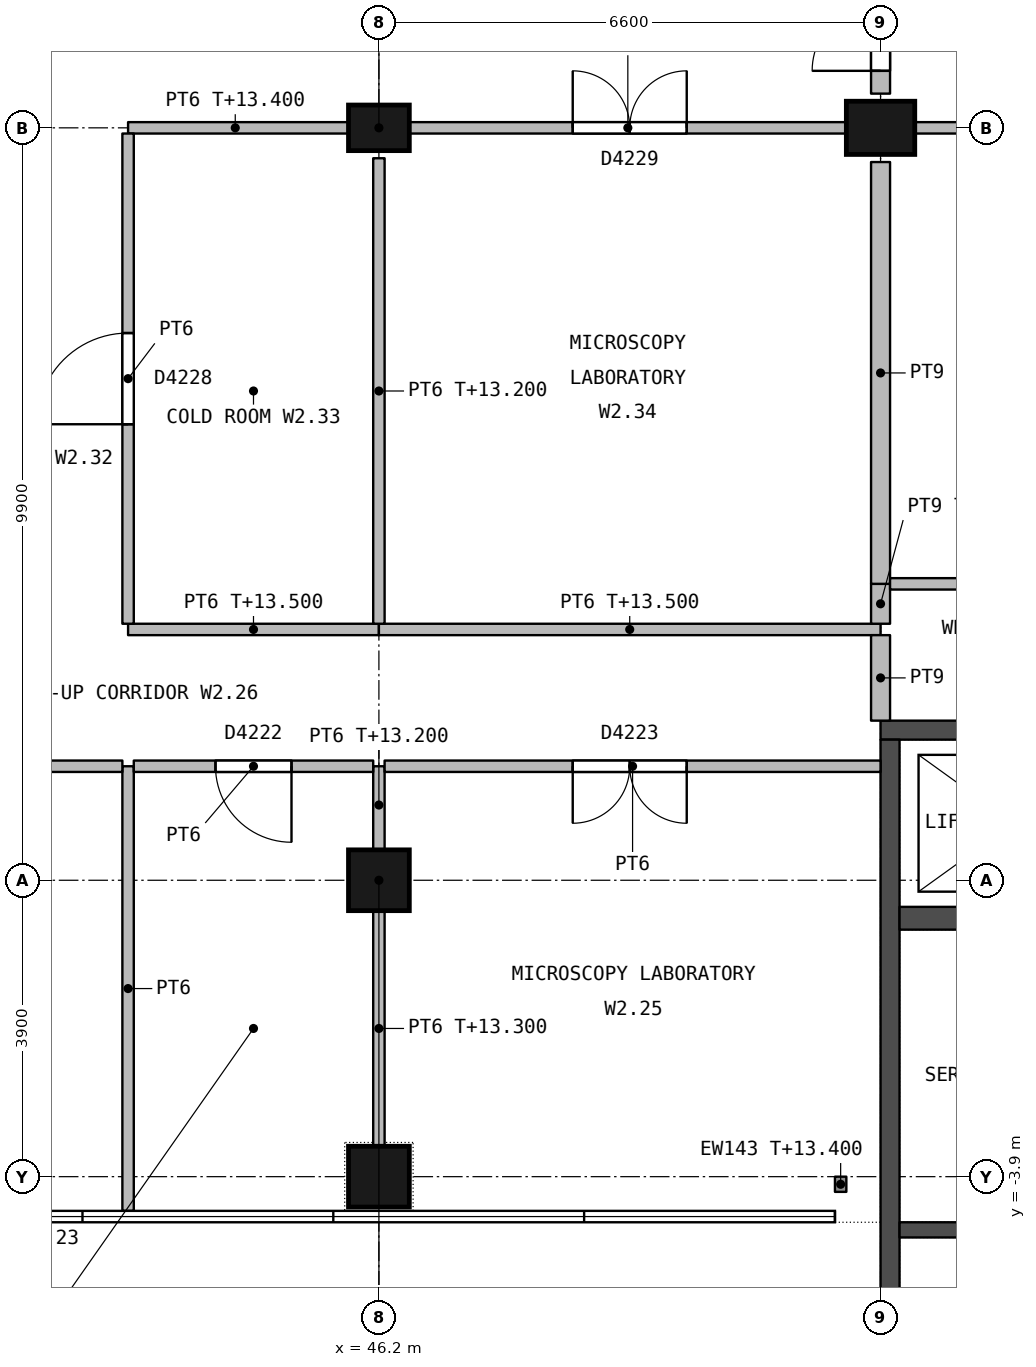
"""IFC4 building model, lengths in metres.
Left out: names, types, materials, properties, quantities, classifications, styles, units other than length and angle.
Written with IfcOpenShell. Run it as: python <this file> out.ifc"""

import sys

from ifc_helpers import new_model, si_unit, direction, frame, frame_2d, origin, origin_2d, place, context, subcontext, project, spatial, rectangle, extrude, element, fill, save


model = new_model("IFC4")
c1 = context("Model", 3, precision=1e-05, world=origin(), true_north=direction((0.0, 1.0)))
c2 = subcontext(c1, "Body", "Model", "MODEL_VIEW")
j1 = project(units=[si_unit("LENGTHUNIT", "METRE"), si_unit("PLANEANGLEUNIT", "RADIAN")], contexts=[c1])
p1 = place(None, origin())
s1 = spatial("IfcSite", under=j1, at=p1, CompositionType="ELEMENT")
p2 = place(p1, origin())
s2 = spatial("IfcBuilding", under=s1, at=p2, CompositionType="ELEMENT")
p3 = place(p2, frame((0.0, 0.0, 9.9)))
s3 = spatial("IfcBuildingStorey", under=s2, at=p3, CompositionType="ELEMENT", Elevation=9.9)
p4 = place(p3, frame((46.2, 0.0, 0.0), z_axis=(0.0, 0.0, 1.0), x_axis=(1.0, 0.0, 0.0)))
e1 = element("IfcColumn", 1, at=p4, inside=s3, PredefinedType="COLUMN", context=c2, shape_type="SweptSolid", body=[
    extrude(rectangle(XDim=0.8, YDim=0.8, at=origin_2d()), origin(), (0.0, 0.0, 1.0), 4.5),
])
p5 = place(p3, frame((46.2, 9.9, 0.0), z_axis=(0.0, 0.0, 1.0), x_axis=(1.0, 0.0, 0.0)))
e2 = element("IfcColumn", 2, at=p5, inside=s3, PredefinedType="COLUMN", context=c2, shape_type="SweptSolid", body=[
    extrude(rectangle(XDim=0.8, YDim=0.6, at=origin_2d()), origin(), (0.0, 0.0, 1.0), 4.5),
])
p6 = place(p3, frame((52.8, 9.9, 0.0), z_axis=(0.0, 0.0, 1.0), x_axis=(1.0, 0.0, 0.0)))
e3 = element("IfcColumn", 3, at=p6, inside=s3, PredefinedType="COLUMN", context=c2, shape_type="SweptSolid", body=[
    extrude(rectangle(XDim=0.9, YDim=0.7, at=origin_2d()), origin(), (0.0, 0.0, 1.0), 4.5),
])
p7 = place(p3, frame((46.2, -3.9, 0.0), z_axis=(0.0, 0.0, 1.0), x_axis=(1.0, 0.0, 0.0)))
e4 = element("IfcColumn", 4, at=p7, inside=s3, PredefinedType="COLUMN", context=c2, shape_type="SweptSolid", body=[
    extrude(rectangle(XDim=0.8, YDim=0.8, at=origin_2d()), origin(), (0.0, 0.0, 1.0), 4.5),
])
p8 = place(p3, frame((59.4, 1.975, 0.0), z_axis=(0.0, 0.0, 1.0), x_axis=(-1.0, 0.0, 0.0)))
e5 = element("IfcWall", 5, at=p8, inside=s3, PredefinedType="SHEAR", context=c2, shape_type="SweptSolid", body=[
    extrude(rectangle(XDim=6.6, YDim=0.25, at=frame_2d((3.3, 0.0))), origin(), (0.0, 0.0, 1.0), 4.2),
])
p9 = place(p8, frame((0.95, 0.0, 0.0)))
e6 = element("IfcOpeningElement", 6, at=p9, cuts=e5, PredefinedType="OPENING", context=c2, shape_type="SweptSolid", body=[
    extrude(rectangle(XDim=1.1, YDim=2.1, at=frame_2d((0.55, 1.05))), frame((0.0, 0.135, 0.0), z_axis=(0.0, -1.0, 0.0), x_axis=(1.0, 0.0, 0.0)), (0.0, 0.0, 1.0), 0.27),
])
p10 = place(p3, frame((52.925, 1.85, 0.0), z_axis=(0.0, 0.0, 1.0), x_axis=(0.0, -1.0, 0.0)))
e7 = element("IfcWall", 7, at=p10, inside=s3, PredefinedType="SHEAR", context=c2, shape_type="SweptSolid", body=[
    extrude(rectangle(XDim=9.4, YDim=0.25, at=frame_2d((4.7, 0.0))), origin(), (0.0, 0.0, 1.0), 4.2),
])
p11 = place(p3, frame((59.15, -4.6, 0.0), z_axis=(0.0, 0.0, 1.0), x_axis=(-1.0, 0.0, 0.0)))
e8 = element("IfcWall", 8, at=p11, inside=s3, PredefinedType="SHEAR", context=c2, shape_type="SweptSolid", body=[
    extrude(rectangle(XDim=6.1, YDim=0.2, at=frame_2d((3.05, 0.0))), origin(), (0.0, 0.0, 1.0), 4.2),
])
p12 = place(p11, frame((0.175, 0.0, 0.0)))
e9 = element("IfcOpeningElement", 9, at=p12, cuts=e8, PredefinedType="OPENING", context=c2, shape_type="SweptSolid", body=[
    extrude(rectangle(XDim=1.0, YDim=2.1, at=frame_2d((0.5, 1.05))), frame((0.0, 0.11, 0.0), z_axis=(0.0, -1.0, 0.0), x_axis=(1.0, 0.0, 0.0)), (0.0, 0.0, 1.0), 0.22),
])
p13 = place(p3, frame((55.85, -0.5, 0.0), z_axis=(0.0, 0.0, 1.0), x_axis=(-1.0, 0.0, 0.0)))
e10 = element("IfcWall", 10, at=p13, inside=s3, PredefinedType="SHEAR", context=c2, shape_type="SweptSolid", body=[
    extrude(rectangle(XDim=2.8, YDim=0.3, at=frame_2d((1.4, 0.0))), origin(), (0.0, 0.0, 1.0), 4.2),
])
p14 = place(p3, frame((52.275, -4.1, 0.0), z_axis=(0.0, 0.0, 1.0), x_axis=(0.0, 1.0, 0.0)))
e11 = element("IfcWall", 11, at=p14, inside=s3, PredefinedType="STANDARD", context=c2, shape_type="SweptSolid", body=[
    extrude(rectangle(XDim=0.2, YDim=0.15, at=frame_2d((0.1, 0.0))), origin(), (0.0, 0.0, 1.0), 3.5),
])
p15 = place(p3, frame((42.9, 9.9, 0.0), z_axis=(0.0, 0.0, 1.0), x_axis=(1.0, 0.0, 0.0)))
e12 = element("IfcWall", 12, at=p15, inside=s3, PredefinedType="PARTITIONING", context=c2, shape_type="SweptSolid", body=[
    extrude(rectangle(XDim=2.9, YDim=0.15, at=frame_2d((1.45, 0.0))), origin(), (0.0, 0.0, 1.0), 3.5),
])
p16 = place(p3, frame((46.6, 9.9, 0.0), z_axis=(0.0, 0.0, 1.0), x_axis=(1.0, 0.0, 0.0)))
e13 = element("IfcWall", 13, at=p16, inside=s3, PredefinedType="PARTITIONING", context=c2, shape_type="SweptSolid", body=[
    extrude(rectangle(XDim=5.75, YDim=0.15, at=frame_2d((2.875, 0.0))), origin(), (0.0, 0.0, 1.0), 3.5),
])
p17 = place(p16, frame((2.15, 0.0, 0.0)))
e14 = element("IfcOpeningElement", 14, at=p17, cuts=e13, PredefinedType="OPENING", context=c2, shape_type="SweptSolid", body=[
    extrude(rectangle(XDim=1.5, YDim=2.1, at=frame_2d((0.75, 1.05))), frame((0.0, 0.085, 0.0), z_axis=(0.0, -1.0, 0.0), x_axis=(1.0, 0.0, 0.0)), (0.0, 0.0, 1.0), 0.17),
])
p18 = place(p3, frame((52.8, 10.35, 0.0), z_axis=(0.0, 0.0, 1.0), x_axis=(0.0, 1.0, 0.0)))
e15 = element("IfcWall", 15, at=p18, inside=s3, PredefinedType="PARTITIONING", context=c2, shape_type="SweptSolid", body=[
    extrude(rectangle(XDim=2.4, YDim=0.25, at=frame_2d((1.2, 0.0))), origin(), (0.0, 0.0, 1.0), 3.6),
])
p19 = place(p18, frame((0.3, 0.0, 0.0)))
e16 = element("IfcOpeningElement", 16, at=p19, cuts=e15, PredefinedType="OPENING", context=c2, shape_type="SweptSolid", body=[
    extrude(rectangle(XDim=1.8, YDim=2.1, at=frame_2d((0.9, 1.05))), frame((0.0, 0.135, 0.0), z_axis=(0.0, -1.0, 0.0), x_axis=(1.0, 0.0, 0.0)), (0.0, 0.0, 1.0), 0.27),
])
p20 = place(p3, frame((42.9, -4.35, 0.0), z_axis=(0.0, 0.0, 1.0), x_axis=(0.0, 1.0, 0.0)))
e17 = element("IfcWall", 17, at=p20, inside=s3, PredefinedType="PARTITIONING", context=c2, shape_type="SweptSolid", body=[
    extrude(rectangle(XDim=5.85, YDim=0.15, at=frame_2d((2.925, 0.0))), origin(), (0.0, 0.0, 1.0), 4.2),
])
p21 = place(p3, frame((42.825, 1.5, 0.0), z_axis=(0.0, 0.0, 1.0), x_axis=(-1.0, 0.0, 0.0)))
e18 = element("IfcWall", 18, at=p21, inside=s3, PredefinedType="PARTITIONING", context=c2, shape_type="SweptSolid", body=[
    extrude(rectangle(XDim=3.15, YDim=0.15, at=frame_2d((1.575, 0.0))), origin(), (0.0, 0.0, 1.0), 4.2),
])
p22 = place(p21, frame((1.075, 0.0, 0.0)))
e19 = element("IfcOpeningElement", 19, at=p22, cuts=e18, PredefinedType="OPENING", context=c2, shape_type="SweptSolid", body=[
    extrude(rectangle(XDim=1.0, YDim=2.1, at=frame_2d((0.5, 1.05))), frame((0.0, 0.085, 0.0), z_axis=(0.0, -1.0, 0.0), x_axis=(1.0, 0.0, 0.0)), (0.0, 0.0, 1.0), 0.17),
])
p23 = place(p3, frame((46.2, -3.5, 0.0), z_axis=(0.0, 0.0, 1.0), x_axis=(0.0, 1.0, 0.0)))
e20 = element("IfcWall", 20, at=p23, inside=s3, PredefinedType="PARTITIONING", context=c2, shape_type="SweptSolid", body=[
    extrude(rectangle(XDim=3.1, YDim=0.15, at=frame_2d((1.55, 0.0))), origin(), (0.0, 0.0, 1.0), 3.4),
])
p24 = place(p3, frame((46.2, 0.4, 0.0), z_axis=(0.0, 0.0, 1.0), x_axis=(0.0, 1.0, 0.0)))
e21 = element("IfcWall", 21, at=p24, inside=s3, PredefinedType="PARTITIONING", context=c2, shape_type="SweptSolid", body=[
    extrude(rectangle(XDim=1.1, YDim=0.15, at=frame_2d((0.55, 0.0))), origin(), (0.0, 0.0, 1.0), 3.3),
])
p25 = place(p3, frame((46.125, 1.5, 0.0), z_axis=(0.0, 0.0, 1.0), x_axis=(-1.0, 0.0, 0.0)))
e22 = element("IfcWall", 22, at=p25, inside=s3, PredefinedType="PARTITIONING", context=c2, shape_type="SweptSolid", body=[
    extrude(rectangle(XDim=3.15, YDim=0.15, at=frame_2d((1.575, 0.0))), origin(), (0.0, 0.0, 1.0), 4.2),
])
p26 = place(p25, frame((1.075, 0.0, 0.0)))
e23 = element("IfcOpeningElement", 23, at=p26, cuts=e22, PredefinedType="OPENING", context=c2, shape_type="SweptSolid", body=[
    extrude(rectangle(XDim=1.0, YDim=2.1, at=frame_2d((0.5, 1.05))), frame((0.0, 0.085, 0.0), z_axis=(0.0, -1.0, 0.0), x_axis=(1.0, 0.0, 0.0)), (0.0, 0.0, 1.0), 0.17),
])
p27 = place(p3, frame((52.8, 1.5, 0.0), z_axis=(0.0, 0.0, 1.0), x_axis=(-1.0, 0.0, 0.0)))
e24 = element("IfcWall", 24, at=p27, inside=s3, PredefinedType="PARTITIONING", context=c2, shape_type="SweptSolid", body=[
    extrude(rectangle(XDim=6.525, YDim=0.15, at=frame_2d((3.262, 0.0))), origin(), (0.0, 0.0, 1.0), 4.2),
])
p28 = place(p27, frame((2.55, 0.0, 0.0)))
e25 = element("IfcOpeningElement", 25, at=p28, cuts=e24, PredefinedType="OPENING", context=c2, shape_type="SweptSolid", body=[
    extrude(rectangle(XDim=1.5, YDim=2.1, at=frame_2d((0.75, 1.05))), frame((0.0, 0.085, 0.0), z_axis=(0.0, -1.0, 0.0), x_axis=(1.0, 0.0, 0.0)), (0.0, 0.0, 1.0), 0.17),
])
p29 = place(p3, frame((46.2, 3.3, 0.0), z_axis=(0.0, 0.0, 1.0), x_axis=(-1.0, 0.0, 0.0)))
e26 = element("IfcWall", 26, at=p29, inside=s3, PredefinedType="PARTITIONING", context=c2, shape_type="SweptSolid", body=[
    extrude(rectangle(XDim=3.3, YDim=0.15, at=frame_2d((1.65, 0.0))), origin(), (0.0, 0.0, 1.0), 3.6),
])
p30 = place(p3, frame((52.8, 3.3, 0.0), z_axis=(0.0, 0.0, 1.0), x_axis=(-1.0, 0.0, 0.0)))
e27 = element("IfcWall", 27, at=p30, inside=s3, PredefinedType="PARTITIONING", context=c2, shape_type="SweptSolid", body=[
    extrude(rectangle(XDim=6.6, YDim=0.15, at=frame_2d((3.3, 0.0))), origin(), (0.0, 0.0, 1.0), 3.6),
])
p31 = place(p3, frame((52.8, 2.1, 0.0), z_axis=(0.0, 0.0, 1.0), x_axis=(0.0, 1.0, 0.0)))
e28 = element("IfcWall", 28, at=p31, inside=s3, PredefinedType="PARTITIONING", context=c2, shape_type="SweptSolid", body=[
    extrude(rectangle(XDim=1.125, YDim=0.25, at=frame_2d((0.562, 0.0))), origin(), (0.0, 0.0, 1.0), 3.3),
])
p32 = place(p3, frame((42.9, 3.375, 0.0), z_axis=(0.0, 0.0, 1.0), x_axis=(0.0, 1.0, 0.0)))
e29 = element("IfcWall", 29, at=p32, inside=s3, PredefinedType="PARTITIONING", context=c2, shape_type="SweptSolid", body=[
    extrude(rectangle(XDim=6.45, YDim=0.15, at=frame_2d((3.225, 0.0))), origin(), (0.0, 0.0, 1.0), 4.2),
])
p33 = place(p32, frame((2.625, 0.0, 0.0)))
e30 = element("IfcOpeningElement", 30, at=p33, cuts=e29, PredefinedType="OPENING", context=c2, shape_type="SweptSolid", body=[
    extrude(rectangle(XDim=1.2, YDim=2.1, at=frame_2d((0.6, 1.05))), frame((0.0, 0.085, 0.0), z_axis=(0.0, -1.0, 0.0), x_axis=(1.0, 0.0, 0.0)), (0.0, 0.0, 1.0), 0.17),
])
p34 = place(p3, frame((46.2, 3.375, 0.0), z_axis=(0.0, 0.0, 1.0), x_axis=(0.0, 1.0, 0.0)))
e31 = element("IfcWall", 31, at=p34, inside=s3, PredefinedType="PARTITIONING", context=c2, shape_type="SweptSolid", body=[
    extrude(rectangle(XDim=6.125, YDim=0.15, at=frame_2d((3.062, 0.0))), origin(), (0.0, 0.0, 1.0), 3.3),
])
p35 = place(p3, frame((52.8, 3.375, 0.0), z_axis=(0.0, 0.0, 1.0), x_axis=(0.0, 1.0, 0.0)))
e32 = element("IfcWall", 32, at=p35, inside=s3, PredefinedType="PARTITIONING", context=c2, shape_type="SweptSolid", body=[
    extrude(rectangle(XDim=0.525, YDim=0.25, at=frame_2d((0.262, 0.0))), origin(), (0.0, 0.0, 1.0), 3.3),
])
p36 = place(p3, frame((52.8, 3.9, 0.0), z_axis=(0.0, 0.0, 1.0), x_axis=(0.0, 1.0, 0.0)))
e33 = element("IfcWall", 33, at=p36, inside=s3, PredefinedType="PARTITIONING", context=c2, shape_type="SweptSolid", body=[
    extrude(rectangle(XDim=5.55, YDim=0.25, at=frame_2d((2.775, 0.0))), origin(), (0.0, 0.0, 1.0), 3.3),
])
p37 = place(p3, frame((53.25, 9.9, 0.0), z_axis=(0.0, 0.0, 1.0), x_axis=(1.0, 0.0, 0.0)))
e34 = element("IfcWall", 34, at=p37, inside=s3, PredefinedType="PARTITIONING", context=c2, shape_type="SweptSolid", body=[
    extrude(rectangle(XDim=5.7, YDim=0.15, at=frame_2d((2.85, 0.0))), origin(), (0.0, 0.0, 1.0), 3.5),
])
p38 = place(p37, frame((2.1, 0.0, 0.0)))
e35 = element("IfcOpeningElement", 35, at=p38, cuts=e34, PredefinedType="OPENING", context=c2, shape_type="SweptSolid", body=[
    extrude(rectangle(XDim=1.5, YDim=2.1, at=frame_2d((0.75, 1.05))), frame((0.0, 0.085, 0.0), z_axis=(0.0, -1.0, 0.0), x_axis=(1.0, 0.0, 0.0)), (0.0, 0.0, 1.0), 0.17),
])
p39 = place(p3, frame((59.4, 3.9, 0.0), z_axis=(0.0, 0.0, 1.0), x_axis=(-1.0, 0.0, 0.0)))
e36 = element("IfcWall", 36, at=p39, inside=s3, PredefinedType="PARTITIONING", context=c2, shape_type="SweptSolid", body=[
    extrude(rectangle(XDim=6.475, YDim=0.15, at=frame_2d((3.237, 0.0))), origin(), (0.0, 0.0, 1.0), 4.2),
])
p40 = place(p19, origin())
e37 = element("IfcDoor", 37, at=p40, inside=s3, OperationType="DOUBLE_DOOR_SINGLE_SWING", PredefinedType="DOOR", context=c2, shape_type="SweptSolid", body=[
    extrude(rectangle(XDim=1.8, YDim=2.1, at=frame_2d((0.9, 1.05))), frame((0.0, 0.03, 0.0), z_axis=(0.0, -1.0, 0.0), x_axis=(1.0, 0.0, 0.0)), (0.0, 0.0, 1.0), 0.06),
])
fill(e16, e37)
p41 = place(p26, origin())
e38 = element("IfcDoor", 38, at=p41, inside=s3, OperationType="SINGLE_SWING_LEFT", PredefinedType="DOOR", context=c2, shape_type="SweptSolid", body=[
    extrude(rectangle(XDim=1.0, YDim=2.1, at=frame_2d((0.5, 1.05))), frame((0.0, 0.027, 0.0), z_axis=(0.0, -1.0, 0.0), x_axis=(1.0, 0.0, 0.0)), (0.0, 0.0, 1.0), 0.054),
])
fill(e23, e38)
p42 = place(p28, origin())
e39 = element("IfcDoor", 39, at=p42, inside=s3, OperationType="DOUBLE_DOOR_SINGLE_SWING", PredefinedType="DOOR", context=c2, shape_type="SweptSolid", body=[
    extrude(rectangle(XDim=1.5, YDim=2.1, at=frame_2d((0.75, 1.05))), frame((0.0, 0.027, 0.0), z_axis=(0.0, -1.0, 0.0), x_axis=(1.0, 0.0, 0.0)), (0.0, 0.0, 1.0), 0.054),
])
fill(e25, e39)
p43 = place(p33, origin())
e40 = element("IfcDoor", 40, at=p43, inside=s3, OperationType="SINGLE_SWING_LEFT", PredefinedType="DOOR", context=c2, shape_type="SweptSolid", body=[
    extrude(rectangle(XDim=1.2, YDim=2.1, at=frame_2d((0.6, 1.05))), frame((0.0, 0.027, 0.0), z_axis=(0.0, -1.0, 0.0), x_axis=(1.0, 0.0, 0.0)), (0.0, 0.0, 1.0), 0.054),
])
fill(e30, e40)
p44 = place(p17, origin())
e41 = element("IfcDoor", 41, at=p44, inside=s3, OperationType="DOUBLE_DOOR_SINGLE_SWING", PredefinedType="DOOR", context=c2, shape_type="SweptSolid", body=[
    extrude(rectangle(XDim=1.5, YDim=2.1, at=frame_2d((0.75, 1.05))), frame((0.0, 0.027, 0.0), z_axis=(0.0, -1.0, 0.0), x_axis=(1.0, 0.0, 0.0)), (0.0, 0.0, 1.0), 0.054),
])
fill(e14, e41)
save(model, sys.argv[1])
